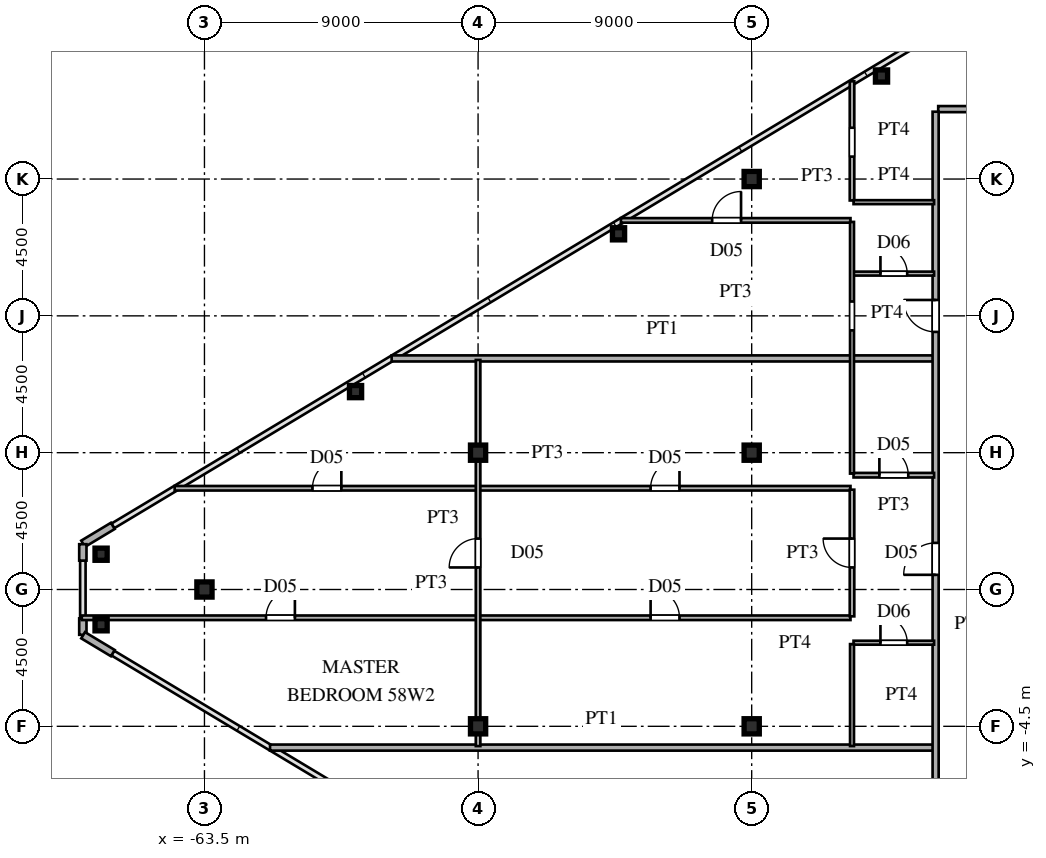
"""IFC4 building model, lengths in metres.
Left out: names, types, materials, properties, quantities, classifications, styles, units other than length and angle.
Written with IfcOpenShell. Run it as: python <this file> out.ifc"""

import sys

from ifc_helpers import new_model, si_unit, direction, frame, frame_2d, origin, origin_2d, place, context, subcontext, project, spatial, rectangle, hollow_rectangle, i_section, extrude, source, transform, mapped, element, fill, save


model = new_model("IFC4")
c1 = context("Model", 3, precision=1e-05, world=origin(), true_north=direction((0.0, 1.0)))
c2 = subcontext(c1, "Body", "Model", "MODEL_VIEW")
j1 = project(units=[si_unit("LENGTHUNIT", "METRE"), si_unit("PLANEANGLEUNIT", "RADIAN")], contexts=[c1])
p1 = place(None, origin())
s1 = spatial("IfcSite", under=j1, at=p1, CompositionType="ELEMENT")
p2 = place(p1, origin())
s2 = spatial("IfcBuilding", under=s1, at=p2, CompositionType="ELEMENT")
p3 = place(p2, frame((0.0, 0.0, 217.5)))
s3 = spatial("IfcBuildingStorey", under=s2, at=p3, CompositionType="ELEMENT", Elevation=217.5)
m1 = source(origin(), c2, "Body", "SweptSolid", [
    extrude(i_section(OverallWidth=0.5, OverallDepth=0.5, WebThickness=0.02, FlangeThickness=0.032, at=origin_2d()), origin(), (0.0, 0.0, 1.0), 3.6),
])
for number, where, z_axis, x_axis in (
    (1, (-45.5, -4.5, 0.0), (0.0, 0.0, 1.0), (1.0, 0.0, 0.0)),
    (2, (-45.5, 4.5, 0.0), (0.0, 0.0, 1.0), (1.0, 0.0, 0.0)),
    (3, (-45.5, 13.5, 0.0), (0.0, 0.0, 1.0), (1.0, 0.0, 0.0)),
    (4, (-54.5, -4.5, 0.0), (0.0, 0.0, 1.0), (1.0, 0.0, 0.0)),
    (5, (-54.5, 4.5, 0.0), (0.0, 0.0, 1.0), (1.0, 0.0, 0.0)),
    (6, (-63.5, 0.0, 0.0), (0.0, 0.0, 1.0), (1.0, 0.0, 0.0)),
):
    element("IfcColumn", number, at=place(p3, frame(where, z_axis=z_axis, x_axis=x_axis)), inside=s3, PredefinedType="COLUMN", context=c2, shape_type="MappedRepresentation", body=[
        mapped(m1, transform((0.0, 0.0, 0.0), scale=1.0)),
    ])
m2 = source(origin(), c2, "Body", "SweptSolid", [
    extrude(hollow_rectangle(XDim=0.4, YDim=0.4, WallThickness=0.016, at=origin_2d()), origin(), (0.0, 0.0, 1.0), 3.6),
])
for number, where, z_axis, x_axis in (
    (7, (-66.9, 1.16, 0.0), (0.0, 0.0, 1.0), (1.0, 0.0, 0.0)),
    (8, (-66.9, -1.16, 0.0), (0.0, 0.0, 1.0), (1.0, 0.0, 0.0)),
    (9, (-41.23, 16.889, 0.0), (0.0, 0.0, 1.0), (1.0, 0.0, 0.0)),
    (10, (-49.88, 11.699, 0.0), (0.0, 0.0, 1.0), (1.0, 0.0, 0.0)),
    (11, (-58.53, 6.509, 0.0), (0.0, 0.0, 1.0), (1.0, 0.0, 0.0)),
):
    element("IfcColumn", number, at=place(p3, frame(where, z_axis=z_axis, x_axis=x_axis)), inside=s3, PredefinedType="COLUMN", context=c2, shape_type="MappedRepresentation", body=[
        mapped(m2, transform((0.0, 0.0, 0.0), scale=1.0)),
    ])
p4 = place(p3, frame((-66.514, 2.092, 0.0), z_axis=(0.0, 0.0, 1.0), x_axis=(-0.85743623509, -0.514590228002, 0.0)))
e12 = element("IfcWall", 12, at=p4, inside=s3, PredefinedType="SOLIDWALL", context=c2, shape_type="SweptSolid", body=[
    extrude(rectangle(XDim=1.14, YDim=0.24, at=frame_2d((0.57, 0.0))), origin(), (0.0, 0.0, 1.0), 3.38),
])
for number, where, z_axis, x_axis in (
    (13, (-67.5, 1.49, 0.0), (0.0, 0.0, 1.0), (0.0, -1.0, 0.0)),
    (14, (-67.5, -0.95, 0.0), (0.0, 0.0, 1.0), (0.0, -1.0, 0.0)),
):
    element("IfcWall", number, at=place(p3, frame(where, z_axis=z_axis, x_axis=x_axis)), inside=s3, PredefinedType="SOLIDWALL", context=c2, shape_type="SweptSolid", body=[
        extrude(rectangle(XDim=0.54, YDim=0.24, at=frame_2d((0.27, 0.0))), origin(), (0.0, 0.0, 1.0), 3.38),
    ])
p5 = place(p3, frame((-67.491, -1.505, 0.0), z_axis=(0.0, 0.0, 1.0), x_axis=(0.85743623509, -0.514590228002, 0.0)))
e15 = element("IfcWall", 15, at=p5, inside=s3, PredefinedType="SOLIDWALL", context=c2, shape_type="SweptSolid", body=[
    extrude(rectangle(XDim=1.14, YDim=0.24, at=frame_2d((0.57, 0.0))), origin(), (0.0, 0.0, 1.0), 3.38),
])
p6 = place(p3, frame((-61.343, -5.2, 0.0), z_axis=(0.0, 0.0, 1.0), x_axis=(1.0, 0.0, 0.0)))
e16 = element("IfcWall", 16, at=p6, inside=s3, PredefinedType="PARTITIONING", context=c2, shape_type="SweptSolid", body=[
    extrude(rectangle(XDim=21.813, YDim=0.2, at=frame_2d((10.906, 0.0))), origin(), (0.0, 0.0, 1.0), 3.38),
])
p7 = place(p3, frame((-42.15, -1.75, 0.0), z_axis=(0.0, 0.0, 1.0), x_axis=(1.0, 0.0, 0.0)))
e17 = element("IfcWall", 17, at=p7, inside=s3, PredefinedType="PARTITIONING", context=c2, shape_type="SweptSolid", body=[
    extrude(rectangle(XDim=2.65, YDim=0.13, at=frame_2d((1.325, 0.0))), origin(), (0.0, 0.0, 1.0), 3.38),
])
p8 = place(p7, frame((0.885, 0.0, 0.0)))
e18 = element("IfcOpeningElement", 18, at=p8, cuts=e17, PredefinedType="OPENING", context=c2, shape_type="SweptSolid", body=[
    extrude(rectangle(XDim=0.88, YDim=2.1, at=frame_2d((0.44, 1.05))), frame((0.0, 0.075, 0.0), z_axis=(0.0, -1.0, 0.0), x_axis=(1.0, 0.0, 0.0)), (0.0, 0.0, 1.0), 0.15),
])
p9 = place(p3, frame((-67.535, -0.93, 0.0), z_axis=(0.0, 0.0, 1.0), x_axis=(1.0, 0.0, 0.0)))
e19 = element("IfcWall", 19, at=p9, inside=s3, PredefinedType="PARTITIONING", context=c2, shape_type="SweptSolid", body=[
    extrude(rectangle(XDim=25.285, YDim=0.15, at=frame_2d((12.643, 0.0))), origin(), (0.0, 0.0, 1.0), 3.38),
])
p10 = place(p9, frame((18.71, 0.0, 0.0)))
e20 = element("IfcOpeningElement", 20, at=p10, cuts=e19, PredefinedType="OPENING", context=c2, shape_type="SweptSolid", body=[
    extrude(rectangle(XDim=0.95, YDim=2.15, at=frame_2d((0.475, 1.075))), frame((0.0, 0.085, 0.0), z_axis=(0.0, -1.0, 0.0), x_axis=(1.0, 0.0, 0.0)), (0.0, 0.0, 1.0), 0.17),
])
p11 = place(p9, frame((6.06, 0.0, 0.0)))
e21 = element("IfcOpeningElement", 21, at=p11, cuts=e19, PredefinedType="OPENING", context=c2, shape_type="SweptSolid", body=[
    extrude(rectangle(XDim=0.95, YDim=2.15, at=frame_2d((0.475, 1.075))), frame((0.0, 0.085, 0.0), z_axis=(0.0, -1.0, 0.0), x_axis=(1.0, 0.0, 0.0)), (0.0, 0.0, 1.0), 0.17),
])
p12 = place(p3, frame((-64.48, 3.33, 0.0), z_axis=(0.0, 0.0, 1.0), x_axis=(1.0, 0.0, 0.0)))
e22 = element("IfcWall", 22, at=p12, inside=s3, PredefinedType="PARTITIONING", context=c2, shape_type="SweptSolid", body=[
    extrude(rectangle(XDim=22.23, YDim=0.15, at=frame_2d((11.115, 0.0))), origin(), (0.0, 0.0, 1.0), 3.38),
])
p13 = place(p12, frame((15.655, 0.0, 0.0)))
e23 = element("IfcOpeningElement", 23, at=p13, cuts=e22, PredefinedType="OPENING", context=c2, shape_type="SweptSolid", body=[
    extrude(rectangle(XDim=0.95, YDim=2.15, at=frame_2d((0.475, 1.075))), frame((0.0, 0.085, 0.0), z_axis=(0.0, -1.0, 0.0), x_axis=(1.0, 0.0, 0.0)), (0.0, 0.0, 1.0), 0.17),
])
p14 = place(p12, frame((4.533, 0.0, 0.0)))
e24 = element("IfcOpeningElement", 24, at=p14, cuts=e22, PredefinedType="OPENING", context=c2, shape_type="SweptSolid", body=[
    extrude(rectangle(XDim=0.95, YDim=2.15, at=frame_2d((0.475, 1.075))), frame((0.0, 0.085, 0.0), z_axis=(0.0, -1.0, 0.0), x_axis=(1.0, 0.0, 0.0)), (0.0, 0.0, 1.0), 0.17),
])
p15 = place(p3, frame((-42.15, 3.76, 0.0), z_axis=(0.0, 0.0, 1.0), x_axis=(1.0, 0.0, 0.0)))
e25 = element("IfcWall", 25, at=p15, inside=s3, PredefinedType="PARTITIONING", context=c2, shape_type="SweptSolid", body=[
    extrude(rectangle(XDim=2.65, YDim=0.15, at=frame_2d((1.325, 0.0))), origin(), (0.0, 0.0, 1.0), 3.38),
])
p16 = place(p15, frame((0.85, 0.0, 0.0)))
e26 = element("IfcOpeningElement", 26, at=p16, cuts=e25, PredefinedType="OPENING", context=c2, shape_type="SweptSolid", body=[
    extrude(rectangle(XDim=0.95, YDim=2.15, at=frame_2d((0.475, 1.075))), frame((0.0, 0.085, 0.0), z_axis=(0.0, -1.0, 0.0), x_axis=(1.0, 0.0, 0.0)), (0.0, 0.0, 1.0), 0.17),
])
p17 = place(p3, frame((-57.343, 7.6, 0.0), z_axis=(0.0, 0.0, 1.0), x_axis=(1.0, 0.0, 0.0)))
e27 = element("IfcWall", 27, at=p17, inside=s3, PredefinedType="PARTITIONING", context=c2, shape_type="SweptSolid", body=[
    extrude(rectangle(XDim=17.813, YDim=0.2, at=frame_2d((8.906, 0.0))), origin(), (0.0, 0.0, 1.0), 3.38),
])
p18 = place(p3, frame((-42.15, 10.39, 0.0), z_axis=(0.0, 0.0, 1.0), x_axis=(1.0, 0.0, 0.0)))
e28 = element("IfcWall", 28, at=p18, inside=s3, PredefinedType="PARTITIONING", context=c2, shape_type="SweptSolid", body=[
    extrude(rectangle(XDim=2.65, YDim=0.13, at=frame_2d((1.325, 0.0))), origin(), (0.0, 0.0, 1.0), 3.38),
])
p19 = place(p18, frame((0.885, 0.0, 0.0)))
e29 = element("IfcOpeningElement", 29, at=p19, cuts=e28, PredefinedType="OPENING", context=c2, shape_type="SweptSolid", body=[
    extrude(rectangle(XDim=0.88, YDim=2.1, at=frame_2d((0.44, 1.05))), frame((0.0, 0.075, 0.0), z_axis=(0.0, -1.0, 0.0), x_axis=(1.0, 0.0, 0.0)), (0.0, 0.0, 1.0), 0.15),
])
p20 = place(p3, frame((-49.802, 12.14, 0.0), z_axis=(0.0, 0.0, 1.0), x_axis=(1.0, 0.0, 0.0)))
e30 = element("IfcWall", 30, at=p20, inside=s3, PredefinedType="PARTITIONING", context=c2, shape_type="SweptSolid", body=[
    extrude(rectangle(XDim=7.552, YDim=0.15, at=frame_2d((3.776, 0.0))), origin(), (0.0, 0.0, 1.0), 3.38),
])
p21 = place(p20, frame((3.002, 0.0, 0.0)))
e31 = element("IfcOpeningElement", 31, at=p21, cuts=e30, PredefinedType="OPENING", context=c2, shape_type="SweptSolid", body=[
    extrude(rectangle(XDim=0.95, YDim=2.15, at=frame_2d((0.475, 1.075))), frame((0.0, 0.085, 0.0), z_axis=(0.0, -1.0, 0.0), x_axis=(1.0, 0.0, 0.0)), (0.0, 0.0, 1.0), 0.17),
])
p22 = place(p3, frame((-42.15, 12.74, 0.0), z_axis=(0.0, 0.0, 1.0), x_axis=(1.0, 0.0, 0.0)))
e32 = element("IfcWall", 32, at=p22, inside=s3, PredefinedType="PARTITIONING", context=c2, shape_type="SweptSolid", body=[
    extrude(rectangle(XDim=2.65, YDim=0.13, at=frame_2d((1.325, 0.0))), origin(), (0.0, 0.0, 1.0), 3.38),
])
p23 = place(p3, frame((-39.365, 15.8, 0.0), z_axis=(0.0, 0.0, 1.0), x_axis=(1.0, 0.0, 0.0)))
e33 = element("IfcWall", 33, at=p23, inside=s3, PredefinedType="PARTITIONING", context=c2, shape_type="SweptSolid", body=[
    extrude(rectangle(XDim=11.74, YDim=0.2, at=frame_2d((5.87, 0.0))), origin(), (0.0, 0.0, 1.0), 3.38),
])
p24 = place(p3, frame((-54.5, -5.15, 0.0), z_axis=(0.0, 0.0, 1.0), x_axis=(0.0, 1.0, 0.0)))
e34 = element("IfcWall", 34, at=p24, inside=s3, PredefinedType="PARTITIONING", context=c2, shape_type="SweptSolid", body=[
    extrude(rectangle(XDim=12.7, YDim=0.15, at=frame_2d((6.35, 0.0))), origin(), (0.0, 0.0, 1.0), 2.78),
])
p25 = place(p24, frame((5.875, 0.0, 0.0)))
e35 = element("IfcOpeningElement", 35, at=p25, cuts=e34, PredefinedType="OPENING", context=c2, shape_type="SweptSolid", body=[
    extrude(rectangle(XDim=0.95, YDim=2.15, at=frame_2d((0.475, 1.075))), frame((0.0, 0.085, 0.0), z_axis=(0.0, -1.0, 0.0), x_axis=(1.0, 0.0, 0.0)), (0.0, 0.0, 1.0), 0.17),
])
p26 = place(p3, frame((-42.2, -5.15, 0.0), z_axis=(0.0, 0.0, 1.0), x_axis=(0.0, 1.0, 0.0)))
e36 = element("IfcWall", 36, at=p26, inside=s3, PredefinedType="PARTITIONING", context=c2, shape_type="SweptSolid", body=[
    extrude(rectangle(XDim=3.354, YDim=0.13, at=frame_2d((1.677, 0.0))), origin(), (0.0, 0.0, 1.0), 3.38),
])
p27 = place(p3, frame((-42.2, -0.883, 0.0), z_axis=(0.0, 0.0, 1.0), x_axis=(0.0, 1.0, 0.0)))
e37 = element("IfcWall", 37, at=p27, inside=s3, PredefinedType="PARTITIONING", context=c2, shape_type="SweptSolid", body=[
    extrude(rectangle(XDim=4.166, YDim=0.15, at=frame_2d((2.083, 0.0))), origin(), (0.0, 0.0, 1.0), 3.38),
])
p28 = place(p27, frame((1.608, 0.0, 0.0)))
e38 = element("IfcOpeningElement", 38, at=p28, cuts=e37, PredefinedType="OPENING", context=c2, shape_type="SweptSolid", body=[
    extrude(rectangle(XDim=0.95, YDim=2.15, at=frame_2d((0.475, 1.075))), frame((0.0, 0.085, 0.0), z_axis=(0.0, -1.0, 0.0), x_axis=(1.0, 0.0, 0.0)), (0.0, 0.0, 1.0), 0.17),
])
p29 = place(p3, frame((-42.2, 3.812, 0.0), z_axis=(0.0, 0.0, 1.0), x_axis=(0.0, 1.0, 0.0)))
e39 = element("IfcWall", 39, at=p29, inside=s3, PredefinedType="PARTITIONING", context=c2, shape_type="SweptSolid", body=[
    extrude(rectangle(XDim=8.278, YDim=0.13, at=frame_2d((4.139, 0.0))), origin(), (0.0, 0.0, 1.0), 3.38),
])
p30 = place(p29, frame((4.71, 0.0, 0.0)))
e40 = element("IfcOpeningElement", 40, at=p30, cuts=e39, PredefinedType="OPENING", context=c2, shape_type="SweptSolid", body=[
    extrude(rectangle(XDim=0.95, YDim=2.15, at=frame_2d((0.475, 1.075))), frame((0.0, 0.075, 0.0), z_axis=(0.0, -1.0, 0.0), x_axis=(1.0, 0.0, 0.0)), (0.0, 0.0, 1.0), 0.15),
])
p31 = place(p3, frame((-42.2, 12.795, 0.0), z_axis=(0.0, 0.0, 1.0), x_axis=(0.0, 1.0, 0.0)))
e41 = element("IfcWall", 41, at=p31, inside=s3, PredefinedType="PARTITIONING", context=c2, shape_type="SweptSolid", body=[
    extrude(rectangle(XDim=3.92, YDim=0.15, at=frame_2d((1.96, 0.0))), origin(), (0.0, 0.0, 1.0), 3.38),
])
p32 = place(p31, frame((1.442, 0.0, 0.0)))
e42 = element("IfcOpeningElement", 42, at=p32, cuts=e41, PredefinedType="OPENING", context=c2, shape_type="SweptSolid", body=[
    extrude(rectangle(XDim=0.95, YDim=2.15, at=frame_2d((0.475, 1.075))), frame((0.0, 0.085, 0.0), z_axis=(0.0, -1.0, 0.0), x_axis=(1.0, 0.0, 0.0)), (0.0, 0.0, 1.0), 0.17),
])
p33 = place(p3, frame((-39.45, -15.715, 0.0), z_axis=(0.0, 0.0, 1.0), x_axis=(0.0, 1.0, 0.0)))
e43 = element("IfcWall", 43, at=p33, inside=s3, PredefinedType="PARTITIONING", context=c2, shape_type="SweptSolid", body=[
    extrude(rectangle(XDim=31.43, YDim=0.2, at=frame_2d((15.715, 0.0))), origin(), (0.0, 0.0, 1.0), 3.38),
])
p34 = place(p33, frame((4.69, 0.0, 0.0)))
e44 = element("IfcOpeningElement", 44, at=p34, cuts=e43, PredefinedType="OPENING", context=c2, shape_type="SweptSolid", body=[
    extrude(rectangle(XDim=1.05, YDim=2.25, at=frame_2d((0.525, 1.125))), frame((0.0, 0.11, 0.0), z_axis=(0.0, -1.0, 0.0), x_axis=(1.0, 0.0, 0.0)), (0.0, 0.0, 1.0), 0.22),
])
p35 = place(p33, frame((16.198, 0.0, 0.0)))
e45 = element("IfcOpeningElement", 45, at=p35, cuts=e43, PredefinedType="OPENING", context=c2, shape_type="SweptSolid", body=[
    extrude(rectangle(XDim=1.05, YDim=2.25, at=frame_2d((0.525, 1.125))), frame((0.0, 0.11, 0.0), z_axis=(0.0, -1.0, 0.0), x_axis=(1.0, 0.0, 0.0)), (0.0, 0.0, 1.0), 0.22),
])
p36 = place(p33, frame((24.188, 0.0, 0.0)))
e46 = element("IfcOpeningElement", 46, at=p36, cuts=e43, PredefinedType="OPENING", context=c2, shape_type="SweptSolid", body=[
    extrude(rectangle(XDim=1.05, YDim=2.25, at=frame_2d((0.525, 1.125))), frame((0.0, 0.11, 0.0), z_axis=(0.0, -1.0, 0.0), x_axis=(1.0, 0.0, 0.0)), (0.0, 0.0, 1.0), 0.22),
])
m3 = source(origin(), c2, "Body", "SweptSolid", [
    extrude(rectangle(XDim=0.88, YDim=2.1, at=frame_2d((0.44, 1.05))), frame((0.0, 0.025, 0.0), z_axis=(0.0, -1.0, 0.0), x_axis=(1.0, 0.0, 0.0)), (0.0, 0.0, 1.0), 0.05),
])
p37 = place(p8, origin())
e47 = element("IfcDoor", 47, at=p37, inside=s3, OperationType="SINGLE_SWING_LEFT", PredefinedType="DOOR", context=c2, shape_type="MappedRepresentation", body=[
    mapped(m3, transform((0.0, 0.0, 0.0), scale=1.0)),
])
fill(e18, e47)
m4 = source(origin(), c2, "Body", "SweptSolid", [
    extrude(rectangle(XDim=0.95, YDim=2.15, at=frame_2d((0.475, 1.075))), frame((0.0, 0.025, 0.0), z_axis=(0.0, -1.0, 0.0), x_axis=(1.0, 0.0, 0.0)), (0.0, 0.0, 1.0), 0.05),
])
p38 = place(p10, origin())
e48 = element("IfcDoor", 48, at=p38, inside=s3, OperationType="SINGLE_SWING_LEFT", PredefinedType="DOOR", context=c2, shape_type="MappedRepresentation", body=[
    mapped(m4, transform((0.0, 0.0, 0.0), scale=1.0)),
])
fill(e20, e48)
p39 = place(p11, origin())
e49 = element("IfcDoor", 49, at=p39, inside=s3, OperationType="SINGLE_SWING_RIGHT", PredefinedType="DOOR", context=c2, shape_type="MappedRepresentation", body=[
    mapped(m4, transform((0.0, 0.0, 0.0), scale=1.0)),
])
fill(e21, e49)
p40 = place(p13, origin())
e50 = element("IfcDoor", 50, at=p40, inside=s3, OperationType="SINGLE_SWING_RIGHT", PredefinedType="DOOR", context=c2, shape_type="MappedRepresentation", body=[
    mapped(m4, transform((0.0, 0.0, 0.0), scale=1.0)),
])
fill(e23, e50)
p41 = place(p14, origin())
e51 = element("IfcDoor", 51, at=p41, inside=s3, OperationType="SINGLE_SWING_RIGHT", PredefinedType="DOOR", context=c2, shape_type="MappedRepresentation", body=[
    mapped(m4, transform((0.0, 0.0, 0.0), scale=1.0)),
])
fill(e24, e51)
p42 = place(p16, origin())
e52 = element("IfcDoor", 52, at=p42, inside=s3, OperationType="SINGLE_SWING_LEFT", PredefinedType="DOOR", context=c2, shape_type="MappedRepresentation", body=[
    mapped(m4, transform((0.0, 0.0, 0.0), scale=1.0)),
])
fill(e26, e52)
p43 = place(p19, origin())
e53 = element("IfcDoor", 53, at=p43, inside=s3, OperationType="SINGLE_SWING_LEFT", PredefinedType="DOOR", context=c2, shape_type="MappedRepresentation", body=[
    mapped(m3, transform((0.0, 0.0, 0.0), scale=1.0)),
])
fill(e29, e53)
p44 = place(p21, origin())
e54 = element("IfcDoor", 54, at=p44, inside=s3, OperationType="SINGLE_SWING_RIGHT", PredefinedType="DOOR", context=c2, shape_type="MappedRepresentation", body=[
    mapped(m4, transform((0.0, 0.0, 0.0), scale=1.0)),
])
fill(e31, e54)
p45 = place(p25, origin())
e55 = element("IfcDoor", 55, at=p45, inside=s3, OperationType="SINGLE_SWING_LEFT", PredefinedType="DOOR", context=c2, shape_type="MappedRepresentation", body=[
    mapped(m4, transform((0.0, 0.0, 0.0), scale=1.0)),
])
fill(e35, e55)
p46 = place(p28, origin())
e56 = element("IfcDoor", 56, at=p46, inside=s3, OperationType="SINGLE_SWING_RIGHT", PredefinedType="DOOR", context=c2, shape_type="MappedRepresentation", body=[
    mapped(m4, transform((0.0, 0.0, 0.0), scale=1.0)),
])
fill(e38, e56)
m5 = source(origin(), c2, "Body", "SweptSolid", [
    extrude(rectangle(XDim=1.05, YDim=2.25, at=frame_2d((0.525, 1.125))), frame((0.0, 0.025, 0.0), z_axis=(0.0, -1.0, 0.0), x_axis=(1.0, 0.0, 0.0)), (0.0, 0.0, 1.0), 0.05),
])
p47 = place(p35, origin())
e57 = element("IfcDoor", 57, at=p47, inside=s3, OperationType="SINGLE_SWING_LEFT", PredefinedType="DOOR", context=c2, shape_type="MappedRepresentation", body=[
    mapped(m5, transform((0.0, 0.0, 0.0), scale=1.0)),
])
fill(e45, e57)
p48 = place(p36, origin())
e58 = element("IfcDoor", 58, at=p48, inside=s3, OperationType="SINGLE_SWING_RIGHT", PredefinedType="DOOR", context=c2, shape_type="MappedRepresentation", body=[
    mapped(m5, transform((0.0, 0.0, 0.0), scale=1.0)),
])
fill(e46, e58)
save(model, sys.argv[1])
